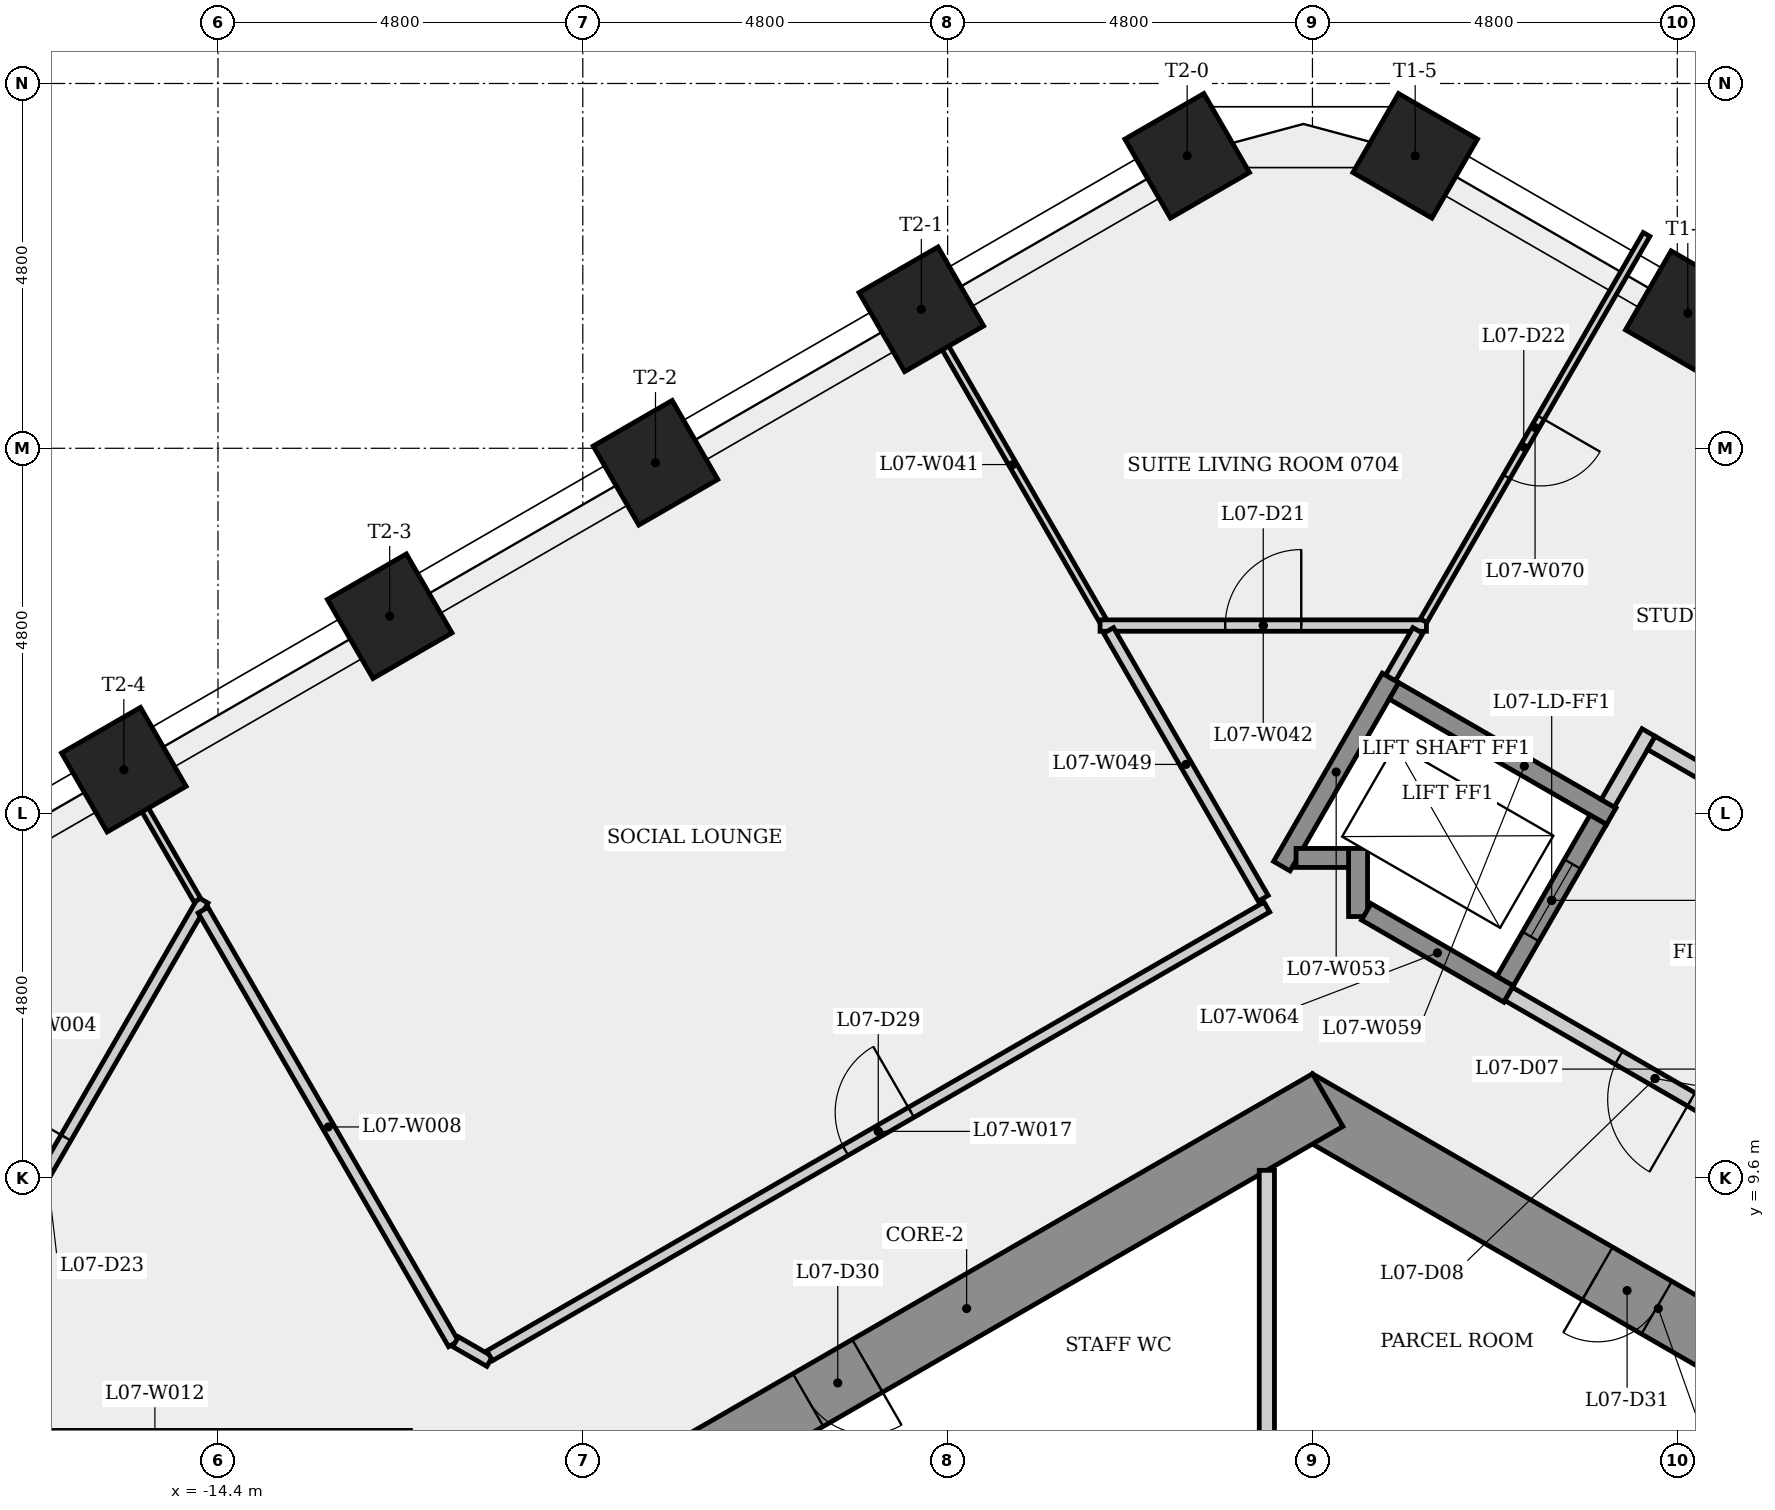
"""IFC4 building model, lengths in metres.
Left out: names, types, materials, properties, quantities, classifications, styles, units other than length and angle.
Written with IfcOpenShell. Run it as: python <this file> out.ifc"""

import sys

from ifc_helpers import new_model, si_unit, direction, frame, frame_2d, origin, origin_2d, place, context, subcontext, project, spatial, rectangle, extrude, element, fill, save


model = new_model("IFC4")
c1 = context("Model", 3, precision=1e-05, world=origin(), true_north=direction((0.0, 1.0)))
c2 = subcontext(c1, "Body", "Model", "MODEL_VIEW")
j1 = project(units=[si_unit("LENGTHUNIT", "METRE"), si_unit("PLANEANGLEUNIT", "RADIAN")], contexts=[c1])
p1 = place(None, origin())
s1 = spatial("IfcSite", under=j1, at=p1, CompositionType="ELEMENT")
p2 = place(p1, origin())
s2 = spatial("IfcBuilding", under=s1, at=p2, CompositionType="ELEMENT")
p3 = place(p2, frame((0.0, 0.0, 32.3)))
s3 = spatial("IfcBuildingStorey", under=s2, at=p3, CompositionType="ELEMENT", Elevation=32.3)
p4 = place(p3, frame((9.3, 5.138, 0.0), z_axis=(0.0, 0.0, 1.0), x_axis=(-0.866023993627, 0.500002442456, 0.0)))
e1 = element("IfcWall", 1, at=p4, inside=s3, PredefinedType="SHEAR", context=c2, shape_type="SweptSolid", body=[
    extrude(rectangle(XDim=10.97, YDim=0.8, at=frame_2d((5.485, 0.0))), origin(), (0.0, 0.0, 1.0), 3.4),
])
p5 = place(p4, frame((5.509, 0.0, 0.0)))
e2 = element("IfcOpeningElement", 2, at=p5, cuts=e1, PredefinedType="OPENING", context=c2, shape_type="SweptSolid", body=[
    extrude(rectangle(XDim=0.9, YDim=2.1, at=frame_2d((0.45, 1.05))), frame((0.0, 0.41, 0.0), z_axis=(0.0, -1.0, 0.0), x_axis=(1.0, 0.0, 0.0)), (0.0, 0.0, 1.0), 0.82),
])
p6 = place(p3, frame((0.2, 10.623, 0.0), z_axis=(0.0, 0.0, 1.0), x_axis=(-0.866023993627, -0.500002442456, 0.0)))
e3 = element("IfcWall", 3, at=p6, inside=s3, PredefinedType="SHEAR", context=c2, shape_type="SweptSolid", body=[
    extrude(rectangle(XDim=10.97, YDim=0.8, at=frame_2d((5.485, 0.0))), origin(), (0.0, 0.0, 1.0), 3.4),
])
p7 = place(p6, frame((6.993, 0.0, 0.0)))
e4 = element("IfcOpeningElement", 4, at=p7, cuts=e3, PredefinedType="OPENING", context=c2, shape_type="SweptSolid", body=[
    extrude(rectangle(XDim=0.9, YDim=2.1, at=frame_2d((0.45, 1.05))), frame((0.0, 0.41, 0.0), z_axis=(0.0, -1.0, 0.0), x_axis=(1.0, 0.0, 0.0)), (0.0, 0.0, 1.0), 0.82),
])
for number, where, z_axis, x_axis in (
    (5, (4.938, 20.978, 0.0), (0.0, 0.0, 1.0), (0.5, 0.866, 0.0)),
    (6, (1.352, 23.048, 0.0), (0.0, 0.0, 1.0), (0.5, 0.866, 0.0)),
    (7, (-1.648, 23.048, 0.0), (0.0, 0.0, 1.0), (-0.5, 0.866, 0.0)),
    (8, (-5.146, 21.029, 0.0), (0.0, 0.0, 1.0), (-0.5, 0.866, 0.0)),
    (9, (-8.644, 19.01, 0.0), (0.0, 0.0, 1.0), (-0.5, 0.866, 0.0)),
    (10, (-12.141, 16.99, 0.0), (0.0, 0.0, 1.0), (-0.5, 0.866, 0.0)),
    (11, (-15.639, 14.971, 0.0), (0.0, 0.0, 1.0), (-0.5, 0.866, 0.0)),
):
    element("IfcColumn", number, at=place(p3, frame(where, z_axis=z_axis, x_axis=x_axis)), inside=s3, PredefinedType="COLUMN", context=c2, shape_type="SweptSolid", body=[
        extrude(rectangle(XDim=1.2, YDim=1.2, at=origin_2d()), origin(), (0.0, 0.0, 1.0), 3.4),
    ])
p8 = place(p3, frame((-18.705, 6.137, 0.0), z_axis=(0.0, 0.0, 1.0), x_axis=(0.499992475648, 0.866029747927, 0.0)))
e12 = element("IfcWall", 12, at=p8, inside=s3, PredefinedType="PARTITIONING", context=c2, shape_type="SweptSolid", body=[
    extrude(rectangle(XDim=8.218, YDim=0.15, at=frame_2d((4.109, 0.0))), origin(), (0.0, 0.0, 1.0), 3.05),
])
p9 = place(p8, frame((3.609, 0.0, 0.0)))
e13 = element("IfcOpeningElement", 13, at=p9, cuts=e12, PredefinedType="OPENING", context=c2, shape_type="SweptSolid", body=[
    extrude(rectangle(XDim=1.0, YDim=2.1, at=frame_2d((0.5, 1.05))), frame((0.0, 0.085, 0.0), z_axis=(0.0, -1.0, 0.0), x_axis=(1.0, 0.0, 0.0)), (0.0, 0.0, 1.0), 0.17),
])
p10 = place(p3, frame((-15.656, 14.961, 0.0), z_axis=(0.0, 0.0, 1.0), x_axis=(0.500069143596, -0.86598548003, 0.0)))
e14 = element("IfcWall", 14, at=p10, inside=s3, PredefinedType="PARTITIONING", context=c2, shape_type="SweptSolid", body=[
    extrude(rectangle(XDim=1.971, YDim=0.1, at=frame_2d((0.985, 0.0))), origin(), (0.0, 0.0, 1.0), 3.05),
])
p11 = place(p3, frame((-14.596, 13.124, 0.0), z_axis=(0.0, 0.0, 1.0), x_axis=(0.500007856214, -0.86602086795, 0.0)))
e15 = element("IfcWall", 15, at=p11, inside=s3, PredefinedType="PARTITIONING", context=c2, shape_type="SweptSolid", body=[
    extrude(rectangle(XDim=6.59, YDim=0.15, at=frame_2d((3.295, 0.0))), origin(), (0.0, 0.0, 1.0), 3.05),
])
p12 = place(p3, frame((-11.273, 7.444, 0.0), z_axis=(0.0, 0.0, 1.0), x_axis=(0.866146335282, -0.499790481981, 0.0)))
e16 = element("IfcWall", 16, at=p12, inside=s3, PredefinedType="PARTITIONING", context=c2, shape_type="SweptSolid", body=[
    extrude(rectangle(XDim=0.518, YDim=0.15, at=frame_2d((0.259, 0.0))), origin(), (0.0, 0.0, 1.0), 3.05),
])
p13 = place(p3, frame((-10.825, 7.26, 0.0), z_axis=(0.0, 0.0, 1.0), x_axis=(0.866025463095, 0.499999897272, 0.0)))
e17 = element("IfcWall", 17, at=p13, inside=s3, PredefinedType="PARTITIONING", context=c2, shape_type="SweptSolid", body=[
    extrude(rectangle(XDim=11.807, YDim=0.15, at=frame_2d((5.903, 0.0))), origin(), (0.0, 0.0, 1.0), 3.05),
])
p14 = place(p13, frame((5.403, 0.0, 0.0)))
e18 = element("IfcOpeningElement", 18, at=p14, cuts=e17, PredefinedType="OPENING", context=c2, shape_type="SweptSolid", body=[
    extrude(rectangle(XDim=1.0, YDim=2.1, at=frame_2d((0.5, 1.05))), frame((0.0, 0.085, 0.0), z_axis=(0.0, -1.0, 0.0), x_axis=(1.0, 0.0, 0.0)), (0.0, 0.0, 1.0), 0.17),
])
p15 = place(p3, frame((-2.757, 16.932, 0.0), z_axis=(0.0, 0.0, 1.0), x_axis=(-0.499992809434, 0.86602955522, 0.0)))
e19 = element("IfcWall", 19, at=p15, inside=s3, PredefinedType="PARTITIONING", context=c2, shape_type="SweptSolid", body=[
    extrude(rectangle(XDim=4.742, YDim=0.1, at=frame_2d((2.371, 0.0))), origin(), (0.0, 0.0, 1.0), 3.05),
])
p16 = place(p3, frame((-2.794, 16.867, 0.0), z_axis=(0.0, 0.0, 1.0), x_axis=(1.0, 0.0, 0.0)))
e20 = element("IfcWall", 20, at=p16, inside=s3, PredefinedType="PARTITIONING", context=c2, shape_type="SweptSolid", body=[
    extrude(rectangle(XDim=4.294, YDim=0.15, at=frame_2d((2.147, 0.0))), origin(), (0.0, 0.0, 1.0), 3.05),
])
p17 = place(p16, frame((1.647, 0.0, 0.0)))
e21 = element("IfcOpeningElement", 21, at=p17, cuts=e20, PredefinedType="OPENING", context=c2, shape_type="SweptSolid", body=[
    extrude(rectangle(XDim=1.0, YDim=2.1, at=frame_2d((0.5, 1.05))), frame((0.0, 0.085, 0.0), z_axis=(0.0, -1.0, 0.0), x_axis=(1.0, 0.0, 0.0)), (0.0, 0.0, 1.0), 0.17),
])
p18 = place(p3, frame((-0.647, 13.279, 0.0), z_axis=(0.0, 0.0, 1.0), x_axis=(-0.499978679558, 0.866037712797, 0.0)))
e22 = element("IfcWall", 22, at=p18, inside=s3, PredefinedType="PARTITIONING", context=c2, shape_type="SweptSolid", body=[
    extrude(rectangle(XDim=4.069, YDim=0.15, at=frame_2d((2.035, 0.0))), origin(), (0.0, 0.0, 1.0), 3.05),
])
p19 = place(p3, frame((-0.6, 9.699, 0.0), z_axis=(0.0, 0.0, 1.0), x_axis=(0.0, -1.0, 0.0)))
e23 = element("IfcWall", 23, at=p19, inside=s3, PredefinedType="PARTITIONING", context=c2, shape_type="SweptSolid", body=[
    extrude(rectangle(XDim=4.425, YDim=0.2, at=frame_2d((2.212, 0.0))), origin(), (0.0, 0.0, 1.0), 3.05),
])
p20 = place(p3, frame((-0.403, 13.702, 0.0), z_axis=(0.0, 0.0, 1.0), x_axis=(0.499976111731, 0.866039195244, 0.0)))
e24 = element("IfcWall", 24, at=p20, inside=s3, PredefinedType="SHEAR", context=c2, shape_type="SweptSolid", body=[
    extrude(rectangle(XDim=2.861, YDim=0.25, at=frame_2d((1.43, 0.0))), origin(), (0.0, 0.0, 1.0), 3.05),
])
p21 = place(p3, frame((0.6, 13.039, 0.0), z_axis=(0.0, 0.0, 1.0), x_axis=(0.0, 1.0, 0.0)))
e25 = element("IfcWall", 25, at=p21, inside=s3, PredefinedType="SHEAR", context=c2, shape_type="SweptSolid", body=[
    extrude(rectangle(XDim=0.896, YDim=0.25, at=frame_2d((0.448, 0.0))), origin(), (0.0, 0.0, 1.0), 3.05),
])
p22 = place(p3, frame((0.475, 13.81, 0.0), z_axis=(0.0, 0.0, 1.0), x_axis=(-1.0, 0.0, 0.0)))
e26 = element("IfcWall", 26, at=p22, inside=s3, PredefinedType="SHEAR", context=c2, shape_type="SweptSolid", body=[
    extrude(rectangle(XDim=0.691, YDim=0.25, at=frame_2d((0.345, 0.0))), origin(), (0.0, 0.0, 1.0), 3.4),
])
p23 = place(p3, frame((1.073, 16.008, 0.0), z_axis=(0.0, 0.0, 1.0), x_axis=(0.866040211805, -0.499974350878, 0.0)))
e27 = element("IfcWall", 27, at=p23, inside=s3, PredefinedType="SHEAR", context=c2, shape_type="SweptSolid", body=[
    extrude(rectangle(XDim=3.3, YDim=0.25, at=frame_2d((1.65, 0.0))), origin(), (0.0, 0.0, 1.0), 3.05),
])
p24 = place(p3, frame((1.387, 16.802, 0.0), z_axis=(0.0, 0.0, 1.0), x_axis=(-0.499859449273, -0.866106535579, 0.0)))
e28 = element("IfcWall", 28, at=p24, inside=s3, PredefinedType="PARTITIONING", context=c2, shape_type="SweptSolid", body=[
    extrude(rectangle(XDim=0.72, YDim=0.15, at=frame_2d((0.36, 0.0))), origin(), (0.0, 0.0, 1.0), 3.05),
])
p25 = place(p3, frame((2.581, 12.02, 0.0), z_axis=(0.0, 0.0, 1.0), x_axis=(-0.86603892542, 0.499976579108, 0.0)))
e29 = element("IfcWall", 29, at=p25, inside=s3, PredefinedType="SHEAR", context=c2, shape_type="SweptSolid", body=[
    extrude(rectangle(XDim=2.162, YDim=0.25, at=frame_2d((1.081, 0.0))), origin(), (0.0, 0.0, 1.0), 3.05),
])
p26 = place(p3, frame((2.535, 12.191, 0.0), z_axis=(0.0, 0.0, 1.0), x_axis=(0.500061746146, 0.865989751695, 0.0)))
e30 = element("IfcWall", 30, at=p26, inside=s3, PredefinedType="SHEAR", context=c2, shape_type="SweptSolid", body=[
    extrude(rectangle(XDim=2.45, YDim=0.25, at=frame_2d((1.225, 0.0))), origin(), (0.0, 0.0, 1.0), 3.4),
])
p27 = place(p26, frame((0.675, 0.0, 0.0)))
e31 = element("IfcOpeningElement", 31, at=p27, cuts=e30, PredefinedType="OPENING", context=c2, shape_type="SweptSolid", body=[
    extrude(rectangle(XDim=1.1, YDim=2.1, at=frame_2d((0.55, 1.05))), frame((0.0, 0.135, 0.0), z_axis=(0.0, -1.0, 0.0), x_axis=(1.0, 0.0, 0.0)), (0.0, 0.0, 1.0), 0.27),
])
p28 = place(p3, frame((3.885, 14.529, 0.0), z_axis=(0.0, 0.0, 1.0), x_axis=(0.499997628298, 0.866026773083, 0.0)))
e32 = element("IfcWall", 32, at=p28, inside=s3, PredefinedType="PARTITIONING", context=c2, shape_type="SweptSolid", body=[
    extrude(rectangle(XDim=1.075, YDim=0.2, at=frame_2d((0.538, 0.0))), origin(), (0.0, 0.0, 1.0), 3.05),
])
p29 = place(p3, frame((4.396, 22.013, 0.0), z_axis=(0.0, 0.0, 1.0), x_axis=(-0.500005810984, -0.866022048785, 0.0)))
e33 = element("IfcWall", 33, at=p29, inside=s3, PredefinedType="PARTITIONING", context=c2, shape_type="SweptSolid", body=[
    extrude(rectangle(XDim=5.867, YDim=0.1, at=frame_2d((2.934, 0.0))), origin(), (0.0, 0.0, 1.0), 3.05),
])
p30 = place(p29, frame((2.781, 0.0, 0.0)))
e34 = element("IfcOpeningElement", 34, at=p30, cuts=e33, PredefinedType="OPENING", context=c2, shape_type="SweptSolid", body=[
    extrude(rectangle(XDim=0.9, YDim=2.1, at=frame_2d((0.45, 1.05))), frame((0.0, 0.06, 0.0), z_axis=(0.0, -1.0, 0.0), x_axis=(1.0, 0.0, 0.0)), (0.0, 0.0, 1.0), 0.12),
])
p31 = place(p3, frame((4.459, 15.323, 0.0), z_axis=(0.0, 0.0, 1.0), x_axis=(0.866016039709, -0.500016218704, 0.0)))
e35 = element("IfcWall", 35, at=p31, inside=s3, PredefinedType="PARTITIONING", context=c2, shape_type="SweptSolid", body=[
    extrude(rectangle(XDim=4.7, YDim=0.2, at=frame_2d((2.35, 0.0))), origin(), (0.0, 0.0, 1.0), 3.05),
])
p32 = place(p3, frame((6.435, 9.795, 0.0), z_axis=(0.0, 0.0, 1.0), x_axis=(-0.866012907634, 0.500021643343, 0.0)))
e36 = element("IfcWall", 36, at=p32, inside=s3, PredefinedType="PARTITIONING", context=c2, shape_type="SweptSolid", body=[
    extrude(rectangle(XDim=4.45, YDim=0.2, at=frame_2d((2.225, 0.0))), origin(), (0.0, 0.0, 1.0), 3.05),
])
p33 = place(p32, frame((1.675, 0.0, 0.0)))
e37 = element("IfcOpeningElement", 37, at=p33, cuts=e36, PredefinedType="OPENING", context=c2, shape_type="SweptSolid", body=[
    extrude(rectangle(XDim=1.1, YDim=2.1, at=frame_2d((0.55, 1.05))), frame((0.0, 0.11, 0.0), z_axis=(0.0, -1.0, 0.0), x_axis=(1.0, 0.0, 0.0)), (0.0, 0.0, 1.0), 0.22),
])
p34 = place(p33, origin())
e38 = element("IfcDoor", 38, at=p34, inside=s3, OperationType="SINGLE_SWING_LEFT", PredefinedType="DOOR", context=c2, shape_type="SweptSolid", body=[
    extrude(rectangle(XDim=1.1, YDim=2.1, at=frame_2d((0.55, 1.05))), frame((0.0, 0.025, 0.0), z_axis=(0.0, -1.0, 0.0), x_axis=(1.0, 0.0, 0.0)), (0.0, 0.0, 1.0), 0.05),
])
fill(e37, e38)
p35 = place(p27, origin())
e39 = element("IfcDoor", 39, at=p35, inside=s3, OperationType="SLIDING_TO_LEFT", PredefinedType="DOOR", context=c2, shape_type="SweptSolid", body=[
    extrude(rectangle(XDim=1.1, YDim=2.1, at=frame_2d((0.55, 1.05))), frame((0.0, 0.025, 0.0), z_axis=(0.0, -1.0, 0.0), x_axis=(1.0, 0.0, 0.0)), (0.0, 0.0, 1.0), 0.05),
])
fill(e31, e39)
p36 = place(p17, origin())
e40 = element("IfcDoor", 40, at=p36, inside=s3, OperationType="SINGLE_SWING_RIGHT", PredefinedType="DOOR", context=c2, shape_type="SweptSolid", body=[
    extrude(rectangle(XDim=1.0, YDim=2.1, at=frame_2d((0.5, 1.05))), frame((0.0, 0.025, 0.0), z_axis=(0.0, -1.0, 0.0), x_axis=(1.0, 0.0, 0.0)), (0.0, 0.0, 1.0), 0.05),
])
fill(e21, e40)
p37 = place(p30, origin())
e41 = element("IfcDoor", 41, at=p37, inside=s3, OperationType="SINGLE_SWING_LEFT", PredefinedType="DOOR", context=c2, shape_type="SweptSolid", body=[
    extrude(rectangle(XDim=0.9, YDim=2.1, at=frame_2d((0.45, 1.05))), frame((0.0, 0.025, 0.0), z_axis=(0.0, -1.0, 0.0), x_axis=(1.0, 0.0, 0.0)), (0.0, 0.0, 1.0), 0.05),
])
fill(e34, e41)
p38 = place(p9, origin())
e42 = element("IfcDoor", 42, at=p38, inside=s3, OperationType="SINGLE_SWING_RIGHT", PredefinedType="DOOR", context=c2, shape_type="SweptSolid", body=[
    extrude(rectangle(XDim=1.0, YDim=2.1, at=frame_2d((0.5, 1.05))), frame((0.0, 0.025, 0.0), z_axis=(0.0, -1.0, 0.0), x_axis=(1.0, 0.0, 0.0)), (0.0, 0.0, 1.0), 0.05),
])
fill(e13, e42)
p39 = place(p14, origin())
e43 = element("IfcDoor", 43, at=p39, inside=s3, OperationType="SINGLE_SWING_RIGHT", PredefinedType="DOOR", context=c2, shape_type="SweptSolid", body=[
    extrude(rectangle(XDim=1.0, YDim=2.1, at=frame_2d((0.5, 1.05))), frame((0.0, 0.025, 0.0), z_axis=(0.0, -1.0, 0.0), x_axis=(1.0, 0.0, 0.0)), (0.0, 0.0, 1.0), 0.05),
])
fill(e18, e43)
p40 = place(p7, origin())
e44 = element("IfcDoor", 44, at=p40, inside=s3, OperationType="SINGLE_SWING_LEFT", PredefinedType="DOOR", context=c2, shape_type="SweptSolid", body=[
    extrude(rectangle(XDim=0.9, YDim=2.1, at=frame_2d((0.45, 1.05))), frame((0.0, 0.025, 0.0), z_axis=(0.0, -1.0, 0.0), x_axis=(1.0, 0.0, 0.0)), (0.0, 0.0, 1.0), 0.05),
])
fill(e4, e44)
p41 = place(p5, origin())
e45 = element("IfcDoor", 45, at=p41, inside=s3, OperationType="SINGLE_SWING_RIGHT", PredefinedType="DOOR", context=c2, shape_type="SweptSolid", body=[
    extrude(rectangle(XDim=0.9, YDim=2.1, at=frame_2d((0.45, 1.05))), frame((0.0, 0.025, 0.0), z_axis=(0.0, -1.0, 0.0), x_axis=(1.0, 0.0, 0.0)), (0.0, 0.0, 1.0), 0.05),
])
fill(e2, e45)
save(model, sys.argv[1])
